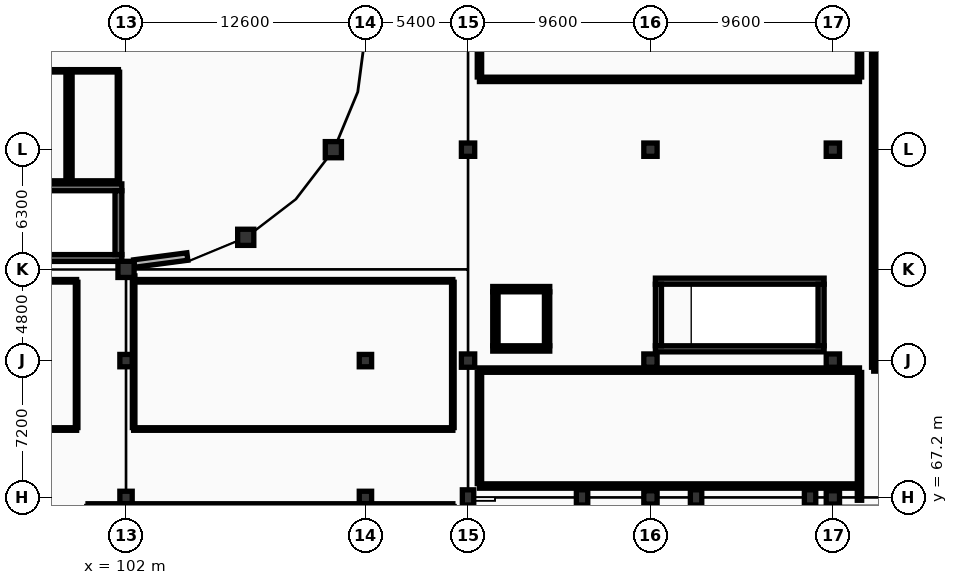
"""IFC4 building model, lengths in metres.
Left out: names, types, materials, properties, quantities, classifications, styles, units other than length and angle.
Written with IfcOpenShell. Run it as: python <this file> out.ifc"""

import sys

from ifc_helpers import new_model, si_unit, direction, frame, frame_2d, origin, origin_2d, place, context, subcontext, project, spatial, rectangle, circle, extrude, element, fill, save


model = new_model("IFC4")
c1 = context("Model", 3, precision=1e-05, world=origin(), true_north=direction((0.0, 1.0)))
c2 = subcontext(c1, "Body", "Model", "MODEL_VIEW")
j1 = project(units=[si_unit("LENGTHUNIT", "METRE"), si_unit("PLANEANGLEUNIT", "RADIAN")], contexts=[c1])
p1 = place(None, origin())
s1 = spatial("IfcSite", under=j1, at=p1, CompositionType="ELEMENT")
p2 = place(p1, origin())
s2 = spatial("IfcBuilding", under=s1, at=p2, CompositionType="ELEMENT")
p3 = place(p2, origin())
s3 = spatial("IfcBuildingStorey", under=s2, at=p3, CompositionType="ELEMENT", Elevation=0.0)
p4 = place(p3, frame((102.0, 79.2, 0.0), z_axis=(0.0, 0.0, 1.0), x_axis=(1.0, 0.0, 0.0)))
e1 = element("IfcColumn", 1, at=p4, inside=s3, PredefinedType="COLUMN", context=c2, shape_type="SweptSolid", body=[
    extrude(rectangle(XDim=0.85, YDim=0.85, at=origin_2d()), origin(), (0.0, 0.0, 1.0), 5.4),
])
for number, where, z_axis, x_axis in (
    (2, (108.3, 80.888, 0.0), (0.0, 0.0, 1.0), (1.0, 0.0, 0.0)),
    (3, (112.912, 85.5, 0.0), (0.0, 0.0, 1.0), (1.0, 0.0, 0.0)),
):
    element("IfcColumn", number, at=place(p3, frame(where, z_axis=z_axis, x_axis=x_axis)), inside=s3, PredefinedType="COLUMN", context=c2, shape_type="SweptSolid", body=[
        extrude(circle(Radius=0.425, at=origin_2d()), origin(), (0.0, 0.0, 1.0), 5.4),
    ])
for number, where, z_axis, x_axis in (
    (4, (120.0, 67.2, 0.0), (0.0, 0.0, 1.0), (1.0, 0.0, 0.0)),
    (5, (126.0, 67.2, 0.0), (0.0, 0.0, 1.0), (1.0, 0.0, 0.0)),
    (6, (132.0, 67.2, 0.0), (0.0, 0.0, 1.0), (1.0, 0.0, 0.0)),
    (7, (138.0, 67.2, 0.0), (0.0, 0.0, 1.0), (1.0, 0.0, 0.0)),
):
    element("IfcColumn", number, at=place(p3, frame(where, z_axis=z_axis, x_axis=x_axis)), inside=s3, PredefinedType="COLUMN", context=c2, shape_type="SweptSolid", body=[
        extrude(rectangle(XDim=0.6, YDim=0.8, at=origin_2d()), origin(), (0.0, 0.0, 1.0), 5.4),
    ])
for number, where, z_axis, x_axis in (
    (8, (120.0, 74.4, 0.0), (0.0, 0.0, 1.0), (1.0, 0.0, 0.0)),
    (9, (120.0, 85.5, 0.0), (0.0, 0.0, 1.0), (1.0, 0.0, 0.0)),
    (10, (129.6, 67.2, 0.0), (0.0, 0.0, 1.0), (1.0, 0.0, 0.0)),
    (11, (129.6, 74.4, 0.0), (0.0, 0.0, 1.0), (1.0, 0.0, 0.0)),
    (12, (129.6, 85.5, 0.0), (0.0, 0.0, 1.0), (1.0, 0.0, 0.0)),
    (13, (139.2, 67.2, 0.0), (0.0, 0.0, 1.0), (1.0, 0.0, 0.0)),
    (14, (139.2, 74.4, 0.0), (0.0, 0.0, 1.0), (1.0, 0.0, 0.0)),
    (15, (139.2, 85.5, 0.0), (0.0, 0.0, 1.0), (1.0, 0.0, 0.0)),
):
    element("IfcColumn", number, at=place(p3, frame(where, z_axis=z_axis, x_axis=x_axis)), inside=s3, PredefinedType="COLUMN", context=c2, shape_type="SweptSolid", body=[
        extrude(rectangle(XDim=0.7, YDim=0.7, at=origin_2d()), origin(), (0.0, 0.0, 1.0), 5.4),
    ])
for number, where, z_axis, x_axis in (
    (16, (102.0, 67.2, 0.0), (0.0, 0.0, 1.0), (1.0, 0.0, 0.0)),
    (17, (102.0, 74.4, 0.0), (0.0, 0.0, 1.0), (1.0, 0.0, 0.0)),
    (18, (114.6, 67.2, 0.0), (0.0, 0.0, 1.0), (1.0, 0.0, 0.0)),
    (19, (114.6, 74.4, 0.0), (0.0, 0.0, 1.0), (1.0, 0.0, 0.0)),
):
    element("IfcColumn", number, at=place(p3, frame(where, z_axis=z_axis, x_axis=x_axis)), inside=s3, PredefinedType="COLUMN", context=c2, shape_type="SweptSolid", body=[
        extrude(rectangle(XDim=0.65, YDim=0.65, at=origin_2d()), origin(), (0.0, 0.0, 1.0), 5.4),
    ])
p5 = place(p3, frame((102.428, 79.509, 0.0), z_axis=(0.0, 0.0, 1.0), x_axis=(0.991443994311, 0.130532778046, 0.0)))
e20 = element("IfcWall", 20, at=p5, inside=s3, PredefinedType="ELEMENTEDWALL", context=c2, shape_type="SweptSolid", body=[
    extrude(rectangle(XDim=2.824, YDim=0.395, at=frame_2d((1.412, 0.0))), origin(), (0.0, 0.0, 1.0), 4.27),
])
p6 = place(p5, frame((0.962, 0.0, 0.85)))
e21 = element("IfcOpeningElement", 21, at=p6, cuts=e20, PredefinedType="OPENING", context=c2, shape_type="SweptSolid", body=[
    extrude(rectangle(XDim=0.9, YDim=1.85, at=frame_2d((0.45, 0.925))), frame((0.0, 0.208, 0.0), z_axis=(0.0, -1.0, 0.0), x_axis=(1.0, 0.0, 0.0)), (0.0, 0.0, 1.0), 0.415),
])
for number, where, z_axis, x_axis in (
    (22, (92.42, 83.52, 0.0), (0.0, 0.0, 1.0), (1.0, 0.0, 0.0)),
    (23, (101.78, 79.8, 0.0), (0.0, 0.0, 1.0), (-1.0, 0.0, 0.0)),
):
    element("IfcWall", number, at=place(p3, frame(where, z_axis=z_axis, x_axis=x_axis)), inside=s3, PredefinedType="SHEAR", context=c2, shape_type="SweptSolid", body=[
        extrude(rectangle(XDim=9.36, YDim=0.36, at=frame_2d((4.68, 0.0))), origin(), (0.0, 0.0, 1.0), 5.14),
    ])
p7 = place(p3, frame((101.6, 83.34, 0.0), z_axis=(0.0, 0.0, 1.0), x_axis=(0.0, -1.0, 0.0)))
e24 = element("IfcWall", 24, at=p7, inside=s3, PredefinedType="SHEAR", context=c2, shape_type="SweptSolid", body=[
    extrude(rectangle(XDim=3.36, YDim=0.36, at=frame_2d((1.68, 0.0))), origin(), (0.0, 0.0, 1.0), 5.14),
])
for number, where, z_axis, x_axis in (
    (25, (129.86, 78.58, 0.0), (0.0, 0.0, 1.0), (1.0, 0.0, 0.0)),
    (26, (138.74, 75.02, 0.0), (0.0, 0.0, 1.0), (-1.0, 0.0, 0.0)),
):
    element("IfcWall", number, at=place(p3, frame(where, z_axis=z_axis, x_axis=x_axis)), inside=s3, PredefinedType="SHEAR", context=c2, shape_type="SweptSolid", body=[
        extrude(rectangle(XDim=8.88, YDim=0.32, at=frame_2d((4.44, 0.0))), origin(), (0.0, 0.0, 1.0), 5.14),
    ])
p8 = place(p3, frame((130.02, 75.18, 0.0), z_axis=(0.0, 0.0, 1.0), x_axis=(0.0, 1.0, 0.0)))
e27 = element("IfcWall", 27, at=p8, inside=s3, PredefinedType="SHEAR", context=c2, shape_type="SweptSolid", body=[
    extrude(rectangle(XDim=3.24, YDim=0.32, at=frame_2d((1.62, 0.0))), origin(), (0.0, 0.0, 1.0), 5.14),
])
p9 = place(p8, frame((1.045, 0.0, 0.0)))
e28 = element("IfcOpeningElement", 28, at=p9, cuts=e27, PredefinedType="OPENING", context=c2, shape_type="SweptSolid", body=[
    extrude(rectangle(XDim=1.15, YDim=2.2, at=frame_2d((0.575, 1.1))), frame((0.0, 0.17, 0.0), z_axis=(0.0, -1.0, 0.0), x_axis=(1.0, 0.0, 0.0)), (0.0, 0.0, 1.0), 0.34),
])
p10 = place(p3, frame((138.58, 78.42, 0.0), z_axis=(0.0, 0.0, 1.0), x_axis=(0.0, -1.0, 0.0)))
e29 = element("IfcWall", 29, at=p10, inside=s3, PredefinedType="SHEAR", context=c2, shape_type="SweptSolid", body=[
    extrude(rectangle(XDim=3.24, YDim=0.32, at=frame_2d((1.62, 0.0))), origin(), (0.0, 0.0, 1.0), 5.14),
])
p11 = place(p3, frame((121.3, 78.16, 0.0), z_axis=(0.0, 0.0, 1.0), x_axis=(1.0, 0.0, 0.0)))
e30 = element("IfcWall", 30, at=p11, inside=s3, PredefinedType="SHEAR", context=c2, shape_type="SweptSolid", body=[
    extrude(rectangle(XDim=3.0, YDim=0.28, at=frame_2d((1.5, 0.0))), origin(), (0.0, 0.0, 1.0), 5.14),
])
p12 = place(p11, frame((0.975, 0.0, 0.0)))
e31 = element("IfcOpeningElement", 31, at=p12, cuts=e30, PredefinedType="OPENING", context=c2, shape_type="SweptSolid", body=[
    extrude(rectangle(XDim=1.05, YDim=2.2, at=frame_2d((0.525, 1.1))), frame((0.0, 0.15, 0.0), z_axis=(0.0, -1.0, 0.0), x_axis=(1.0, 0.0, 0.0)), (0.0, 0.0, 1.0), 0.3),
])
p13 = place(p3, frame((124.3, 75.04, 0.0), z_axis=(0.0, 0.0, 1.0), x_axis=(-1.0, 0.0, 0.0)))
e32 = element("IfcWall", 32, at=p13, inside=s3, PredefinedType="SHEAR", context=c2, shape_type="SweptSolid", body=[
    extrude(rectangle(XDim=3.0, YDim=0.28, at=frame_2d((1.5, 0.0))), origin(), (0.0, 0.0, 1.0), 5.14),
])
for number, where, z_axis, x_axis in (
    (33, (121.44, 75.18, 0.0), (0.0, 0.0, 1.0), (0.0, 1.0, 0.0)),
    (34, (124.16, 78.02, 0.0), (0.0, 0.0, 1.0), (0.0, -1.0, 0.0)),
):
    element("IfcWall", number, at=place(p3, frame(where, z_axis=z_axis, x_axis=x_axis)), inside=s3, PredefinedType="SHEAR", context=c2, shape_type="SweptSolid", body=[
        extrude(rectangle(XDim=2.84, YDim=0.28, at=frame_2d((1.42, 0.0))), origin(), (0.0, 0.0, 1.0), 5.14),
    ])
p14 = place(p3, frame((141.35, 74.05, 0.0), z_axis=(0.0, 0.0, 1.0), x_axis=(0.0, 1.0, 0.0)))
e35 = element("IfcWall", 35, at=p14, inside=s3, PredefinedType="STANDARD", context=c2, shape_type="SweptSolid", body=[
    extrude(rectangle(XDim=38.15, YDim=0.23, at=frame_2d((19.075, 0.0))), origin(), (0.0, 0.0, 1.0), 4.37),
])
p15 = place(p3, frame((148.05, 73.96, 0.0), z_axis=(0.0, 0.0, 1.0), x_axis=(-1.0, 0.0, 0.0)))
e36 = element("IfcWall", 36, at=p15, inside=s3, PredefinedType="STANDARD", context=c2, shape_type="SweptSolid", body=[
    extrude(rectangle(XDim=6.7, YDim=0.23, at=frame_2d((3.35, 0.0))), origin(), (0.0, 0.0, 1.0), 1.3),
])
p16 = place(p3, frame((96.4, 89.65, 0.0), z_axis=(0.0, 0.0, 1.0), x_axis=(1.0, 0.0, 0.0)))
e37 = element("IfcWall", 37, at=p16, inside=s3, PredefinedType="PARTITIONING", context=c2, shape_type="SweptSolid", body=[
    extrude(rectangle(XDim=2.5, YDim=0.125, at=frame_2d((1.25, 0.0))), origin(), (0.0, 0.0, 1.0), 5.125),
])
p17 = place(p16, frame((0.8, 0.0, 0.0)))
e38 = element("IfcOpeningElement", 38, at=p17, cuts=e37, PredefinedType="OPENING", context=c2, shape_type="SweptSolid", body=[
    extrude(rectangle(XDim=0.9, YDim=2.1, at=frame_2d((0.45, 1.05))), frame((0.0, 0.073, 0.0), z_axis=(0.0, -1.0, 0.0), x_axis=(1.0, 0.0, 0.0)), (0.0, 0.0, 1.0), 0.145),
])
p18 = place(p3, frame((98.9, 83.8, 0.0), z_axis=(0.0, 0.0, 1.0), x_axis=(-1.0, 0.0, 0.0)))
e39 = element("IfcWall", 39, at=p18, inside=s3, PredefinedType="PARTITIONING", context=c2, shape_type="SweptSolid", body=[
    extrude(rectangle(XDim=2.5, YDim=0.125, at=frame_2d((1.25, 0.0))), origin(), (0.0, 0.0, 1.0), 5.125),
])
p19 = place(p3, frame((98.9, 89.577, 0.0), z_axis=(0.0, 0.0, 1.0), x_axis=(0.0, -1.0, 0.0)))
e40 = element("IfcWall", 40, at=p19, inside=s3, PredefinedType="PARTITIONING", context=c2, shape_type="SweptSolid", body=[
    extrude(rectangle(XDim=5.705, YDim=0.125, at=frame_2d((2.853, 0.0))), origin(), (0.0, 0.0, 1.0), 4.52),
])
p20 = place(p3, frame((99.1, 89.65, 0.0), z_axis=(0.0, 0.0, 1.0), x_axis=(1.0, 0.0, 0.0)))
e41 = element("IfcWall", 41, at=p20, inside=s3, PredefinedType="PARTITIONING", context=c2, shape_type="SweptSolid", body=[
    extrude(rectangle(XDim=2.5, YDim=0.125, at=frame_2d((1.25, 0.0))), origin(), (0.0, 0.0, 1.0), 4.27),
])
p21 = place(p20, frame((0.75, 0.0, 0.0)))
e42 = element("IfcOpeningElement", 42, at=p21, cuts=e41, PredefinedType="OPENING", context=c2, shape_type="SweptSolid", body=[
    extrude(rectangle(XDim=1.0, YDim=2.1, at=frame_2d((0.5, 1.05))), frame((0.0, 0.073, 0.0), z_axis=(0.0, -1.0, 0.0), x_axis=(1.0, 0.0, 0.0)), (0.0, 0.0, 1.0), 0.145),
])
p22 = place(p3, frame((101.6, 83.8, 0.0), z_axis=(0.0, 0.0, 1.0), x_axis=(-1.0, 0.0, 0.0)))
e43 = element("IfcWall", 43, at=p22, inside=s3, PredefinedType="PARTITIONING", context=c2, shape_type="SweptSolid", body=[
    extrude(rectangle(XDim=2.5, YDim=0.125, at=frame_2d((1.25, 0.0))), origin(), (0.0, 0.0, 1.0), 4.27),
])
p23 = place(p3, frame((99.1, 83.873, 0.0), z_axis=(0.0, 0.0, 1.0), x_axis=(0.0, 1.0, 0.0)))
e44 = element("IfcWall", 44, at=p23, inside=s3, PredefinedType="PARTITIONING", context=c2, shape_type="SweptSolid", body=[
    extrude(rectangle(XDim=5.705, YDim=0.125, at=frame_2d((2.853, 0.0))), origin(), (0.0, 0.0, 1.0), 4.52),
])
p24 = place(p3, frame((101.6, 89.577, 0.0), z_axis=(0.0, 0.0, 1.0), x_axis=(0.0, -1.0, 0.0)))
e45 = element("IfcWall", 45, at=p24, inside=s3, PredefinedType="PARTITIONING", context=c2, shape_type="SweptSolid", body=[
    extrude(rectangle(XDim=5.705, YDim=0.125, at=frame_2d((2.853, 0.0))), origin(), (0.0, 0.0, 1.0), 4.27),
])
p25 = place(p3, frame((61.4, 78.6, 0.0), z_axis=(0.0, 0.0, 1.0), x_axis=(1.0, 0.0, 0.0)))
e46 = element("IfcWall", 46, at=p25, inside=s3, PredefinedType="PARTITIONING", context=c2, shape_type="SweptSolid", body=[
    extrude(rectangle(XDim=38.0, YDim=0.135, at=frame_2d((19.0, 0.0))), origin(), (0.0, 0.0, 1.0), 4.58),
])
p26 = place(p3, frame((99.4, 70.8, 0.0), z_axis=(0.0, 0.0, 1.0), x_axis=(-1.0, 0.0, 0.0)))
e47 = element("IfcWall", 47, at=p26, inside=s3, PredefinedType="PARTITIONING", context=c2, shape_type="SweptSolid", body=[
    extrude(rectangle(XDim=38.0, YDim=0.135, at=frame_2d((19.0, 0.0))), origin(), (0.0, 0.0, 1.0), 4.53),
])
p27 = place(p26, frame((2.167, 0.0, 0.0)))
e48 = element("IfcOpeningElement", 48, at=p27, cuts=e47, PredefinedType="OPENING", context=c2, shape_type="SweptSolid", body=[
    extrude(rectangle(XDim=0.95, YDim=2.15, at=frame_2d((0.475, 1.075))), frame((0.0, 0.077, 0.0), z_axis=(0.0, -1.0, 0.0), x_axis=(1.0, 0.0, 0.0)), (0.0, 0.0, 1.0), 0.155),
])
p28 = place(p3, frame((99.4, 78.522, 0.0), z_axis=(0.0, 0.0, 1.0), x_axis=(0.0, -1.0, 0.0)))
e49 = element("IfcWall", 49, at=p28, inside=s3, PredefinedType="PARTITIONING", context=c2, shape_type="SweptSolid", body=[
    extrude(rectangle(XDim=7.645, YDim=0.135, at=frame_2d((3.823, 0.0))), origin(), (0.0, 0.0, 1.0), 4.33),
])
p29 = place(p3, frame((102.4, 78.6, 0.0), z_axis=(0.0, 0.0, 1.0), x_axis=(1.0, 0.0, 0.0)))
e50 = element("IfcWall", 50, at=p29, inside=s3, PredefinedType="PARTITIONING", context=c2, shape_type="SweptSolid", body=[
    extrude(rectangle(XDim=16.8, YDim=0.135, at=frame_2d((8.4, 0.0))), origin(), (0.0, 0.0, 1.0), 4.17),
])
p30 = place(p3, frame((119.2, 70.8, 0.0), z_axis=(0.0, 0.0, 1.0), x_axis=(-1.0, 0.0, 0.0)))
e51 = element("IfcWall", 51, at=p30, inside=s3, PredefinedType="PARTITIONING", context=c2, shape_type="SweptSolid", body=[
    extrude(rectangle(XDim=16.8, YDim=0.135, at=frame_2d((8.4, 0.0))), origin(), (0.0, 0.0, 1.0), 4.53),
])
p31 = place(p30, frame((2.623, 0.0, 0.0)))
e52 = element("IfcOpeningElement", 52, at=p31, cuts=e51, PredefinedType="OPENING", context=c2, shape_type="SweptSolid", body=[
    extrude(rectangle(XDim=0.95, YDim=2.15, at=frame_2d((0.475, 1.075))), frame((0.0, 0.077, 0.0), z_axis=(0.0, -1.0, 0.0), x_axis=(1.0, 0.0, 0.0)), (0.0, 0.0, 1.0), 0.155),
])
p32 = place(p3, frame((102.4, 70.877, 0.0), z_axis=(0.0, 0.0, 1.0), x_axis=(0.0, 1.0, 0.0)))
e53 = element("IfcWall", 53, at=p32, inside=s3, PredefinedType="PARTITIONING", context=c2, shape_type="SweptSolid", body=[
    extrude(rectangle(XDim=7.983, YDim=0.135, at=frame_2d((3.991, 0.0))), origin(), (0.0, 0.0, 1.0), 4.23),
])
p33 = place(p3, frame((119.2, 78.522, 0.0), z_axis=(0.0, 0.0, 1.0), x_axis=(0.0, -1.0, 0.0)))
e54 = element("IfcWall", 54, at=p33, inside=s3, PredefinedType="PARTITIONING", context=c2, shape_type="SweptSolid", body=[
    extrude(rectangle(XDim=7.645, YDim=0.135, at=frame_2d((3.823, 0.0))), origin(), (0.0, 0.0, 1.0), 4.43),
])
p34 = place(p3, frame((100.0, 66.8, 0.0), z_axis=(0.0, 0.0, 1.0), x_axis=(1.0, 0.0, 0.0)))
e55 = element("IfcWall", 55, at=p34, inside=s3, PredefinedType="PARTITIONING", context=c2, shape_type="SweptSolid", body=[
    extrude(rectangle(XDim=19.2, YDim=0.135, at=frame_2d((9.6, 0.0))), origin(), (0.0, 0.0, 1.0), 4.13),
])
p35 = place(p34, frame((5.615, 0.0, 0.0)))
e56 = element("IfcOpeningElement", 56, at=p35, cuts=e55, PredefinedType="OPENING", context=c2, shape_type="SweptSolid", body=[
    extrude(rectangle(XDim=0.95, YDim=2.15, at=frame_2d((0.475, 1.075))), frame((0.0, 0.077, 0.0), z_axis=(0.0, -1.0, 0.0), x_axis=(1.0, 0.0, 0.0)), (0.0, 0.0, 1.0), 0.155),
])
p36 = place(p3, frame((120.6, 73.9, 0.0), z_axis=(0.0, 0.0, 1.0), x_axis=(1.0, 0.0, 0.0)))
e57 = element("IfcWall", 57, at=p36, inside=s3, PredefinedType="STANDARD", context=c2, shape_type="SweptSolid", body=[
    extrude(rectangle(XDim=20.0, YDim=0.23, at=frame_2d((10.0, 0.0))), origin(), (0.0, 0.0, 1.0), 4.62),
])
p37 = place(p36, frame((5.825, 0.0, 0.0)))
e58 = element("IfcOpeningElement", 58, at=p37, cuts=e57, PredefinedType="OPENING", context=c2, shape_type="SweptSolid", body=[
    extrude(rectangle(XDim=1.05, YDim=2.15, at=frame_2d((0.525, 1.075))), frame((0.0, 0.125, 0.0), z_axis=(0.0, -1.0, 0.0), x_axis=(1.0, 0.0, 0.0)), (0.0, 0.0, 1.0), 0.25),
])
p38 = place(p3, frame((140.6, 67.8, 0.0), z_axis=(0.0, 0.0, 1.0), x_axis=(-1.0, 0.0, 0.0)))
e59 = element("IfcWall", 59, at=p38, inside=s3, PredefinedType="STANDARD", context=c2, shape_type="SweptSolid", body=[
    extrude(rectangle(XDim=20.0, YDim=0.23, at=frame_2d((10.0, 0.0))), origin(), (0.0, 0.0, 1.0), 4.62),
])
p39 = place(p3, frame((120.6, 67.925, 0.0), z_axis=(0.0, 0.0, 1.0), x_axis=(0.0, 1.0, 0.0)))
e60 = element("IfcWall", 60, at=p39, inside=s3, PredefinedType="STANDARD", context=c2, shape_type="SweptSolid", body=[
    extrude(rectangle(XDim=5.85, YDim=0.23, at=frame_2d((2.925, 0.0))), origin(), (0.0, 0.0, 1.0), 4.57),
])
p40 = place(p3, frame((140.6, 73.775, 0.0), z_axis=(0.0, 0.0, 1.0), x_axis=(0.0, -1.0, 0.0)))
e61 = element("IfcWall", 61, at=p40, inside=s3, PredefinedType="STANDARD", context=c2, shape_type="SweptSolid", body=[
    extrude(rectangle(XDim=6.725, YDim=0.23, at=frame_2d((3.362, 0.0))), origin(), (0.0, 0.0, 1.0), 4.47),
])
p41 = place(p3, frame((140.6, 89.2, 0.0), z_axis=(0.0, 0.0, 1.0), x_axis=(-1.0, 0.0, 0.0)))
e62 = element("IfcWall", 62, at=p41, inside=s3, PredefinedType="STANDARD", context=c2, shape_type="SweptSolid", body=[
    extrude(rectangle(XDim=20.0, YDim=0.23, at=frame_2d((10.0, 0.0))), origin(), (0.0, 0.0, 1.0), 4.27),
])
p42 = place(p41, frame((2.175, 0.0, 0.0)))
e63 = element("IfcOpeningElement", 63, at=p42, cuts=e62, PredefinedType="OPENING", context=c2, shape_type="SweptSolid", body=[
    extrude(rectangle(XDim=1.05, YDim=2.15, at=frame_2d((0.525, 1.075))), frame((0.0, 0.125, 0.0), z_axis=(0.0, -1.0, 0.0), x_axis=(1.0, 0.0, 0.0)), (0.0, 0.0, 1.0), 0.25),
])
for number, where, z_axis, x_axis in (
    (64, (120.6, 89.325, 0.0), (0.0, 0.0, 1.0), (0.0, 1.0, 0.0)),
    (65, (140.6, 112.336, 0.0), (0.0, 0.0, 1.0), (0.0, -1.0, 0.0)),
):
    element("IfcWall", number, at=place(p3, frame(where, z_axis=z_axis, x_axis=x_axis)), inside=s3, PredefinedType="STANDARD", context=c2, shape_type="SweptSolid", body=[
        extrude(rectangle(XDim=23.011, YDim=0.23, at=frame_2d((11.505, 0.0))), origin(), (0.0, 0.0, 1.0), 4.37),
    ])
p43 = place(p6, origin())
e66 = element("IfcWindow", 66, at=p43, inside=s3, PartitioningType="SINGLE_PANEL", PredefinedType="WINDOW", context=c2, shape_type="SweptSolid", body=[
    extrude(rectangle(XDim=0.9, YDim=1.85, at=frame_2d((0.45, 0.925))), frame((0.0, 0.03, 0.0), z_axis=(0.0, -1.0, 0.0), x_axis=(1.0, 0.0, 0.0)), (0.0, 0.0, 1.0), 0.06),
])
fill(e21, e66)
p44 = place(p9, origin())
e67 = element("IfcDoor", 67, at=p44, inside=s3, OperationType="SINGLE_SWING_RIGHT", PredefinedType="DOOR", context=c2, shape_type="SweptSolid", body=[
    extrude(rectangle(XDim=1.15, YDim=2.2, at=frame_2d((0.575, 1.1))), frame((0.0, 0.025, 0.0), z_axis=(0.0, -1.0, 0.0), x_axis=(1.0, 0.0, 0.0)), (0.0, 0.0, 1.0), 0.05),
])
fill(e28, e67)
p45 = place(p12, origin())
e68 = element("IfcDoor", 68, at=p45, inside=s3, OperationType="DOUBLE_DOOR_SLIDING", PredefinedType="DOOR", context=c2, shape_type="SweptSolid", body=[
    extrude(rectangle(XDim=1.05, YDim=2.2, at=frame_2d((0.525, 1.1))), frame((0.0, 0.025, 0.0), z_axis=(0.0, -1.0, 0.0), x_axis=(1.0, 0.0, 0.0)), (0.0, 0.0, 1.0), 0.05),
])
fill(e31, e68)
p46 = place(p21, origin())
e69 = element("IfcDoor", 69, at=p46, inside=s3, OperationType="SINGLE_SWING_LEFT", PredefinedType="DOOR", context=c2, shape_type="SweptSolid", body=[
    extrude(rectangle(XDim=1.0, YDim=2.1, at=frame_2d((0.5, 1.05))), frame((0.0, 0.025, 0.0), z_axis=(0.0, -1.0, 0.0), x_axis=(1.0, 0.0, 0.0)), (0.0, 0.0, 1.0), 0.05),
])
fill(e42, e69)
p47 = place(p31, origin())
e70 = element("IfcDoor", 70, at=p47, inside=s3, OperationType="SINGLE_SWING_RIGHT", PredefinedType="DOOR", context=c2, shape_type="SweptSolid", body=[
    extrude(rectangle(XDim=0.95, YDim=2.15, at=frame_2d((0.475, 1.075))), frame((0.0, 0.025, 0.0), z_axis=(0.0, -1.0, 0.0), x_axis=(1.0, 0.0, 0.0)), (0.0, 0.0, 1.0), 0.05),
])
fill(e52, e70)
p48 = place(p35, origin())
e71 = element("IfcDoor", 71, at=p48, inside=s3, OperationType="SINGLE_SWING_LEFT", PredefinedType="DOOR", context=c2, shape_type="SweptSolid", body=[
    extrude(rectangle(XDim=0.95, YDim=2.15, at=frame_2d((0.475, 1.075))), frame((0.0, 0.025, 0.0), z_axis=(0.0, -1.0, 0.0), x_axis=(1.0, 0.0, 0.0)), (0.0, 0.0, 1.0), 0.05),
])
fill(e56, e71)
p49 = place(p37, origin())
e72 = element("IfcDoor", 72, at=p49, inside=s3, OperationType="SINGLE_SWING_LEFT", PredefinedType="DOOR", context=c2, shape_type="SweptSolid", body=[
    extrude(rectangle(XDim=1.05, YDim=2.15, at=frame_2d((0.525, 1.075))), frame((0.0, 0.025, 0.0), z_axis=(0.0, -1.0, 0.0), x_axis=(1.0, 0.0, 0.0)), (0.0, 0.0, 1.0), 0.05),
])
fill(e58, e72)
p50 = place(p42, origin())
e73 = element("IfcDoor", 73, at=p50, inside=s3, OperationType="SINGLE_SWING_RIGHT", PredefinedType="DOOR", context=c2, shape_type="SweptSolid", body=[
    extrude(rectangle(XDim=1.05, YDim=2.15, at=frame_2d((0.525, 1.075))), frame((0.0, 0.025, 0.0), z_axis=(0.0, -1.0, 0.0), x_axis=(1.0, 0.0, 0.0)), (0.0, 0.0, 1.0), 0.05),
])
fill(e63, e73)
save(model, sys.argv[1])
